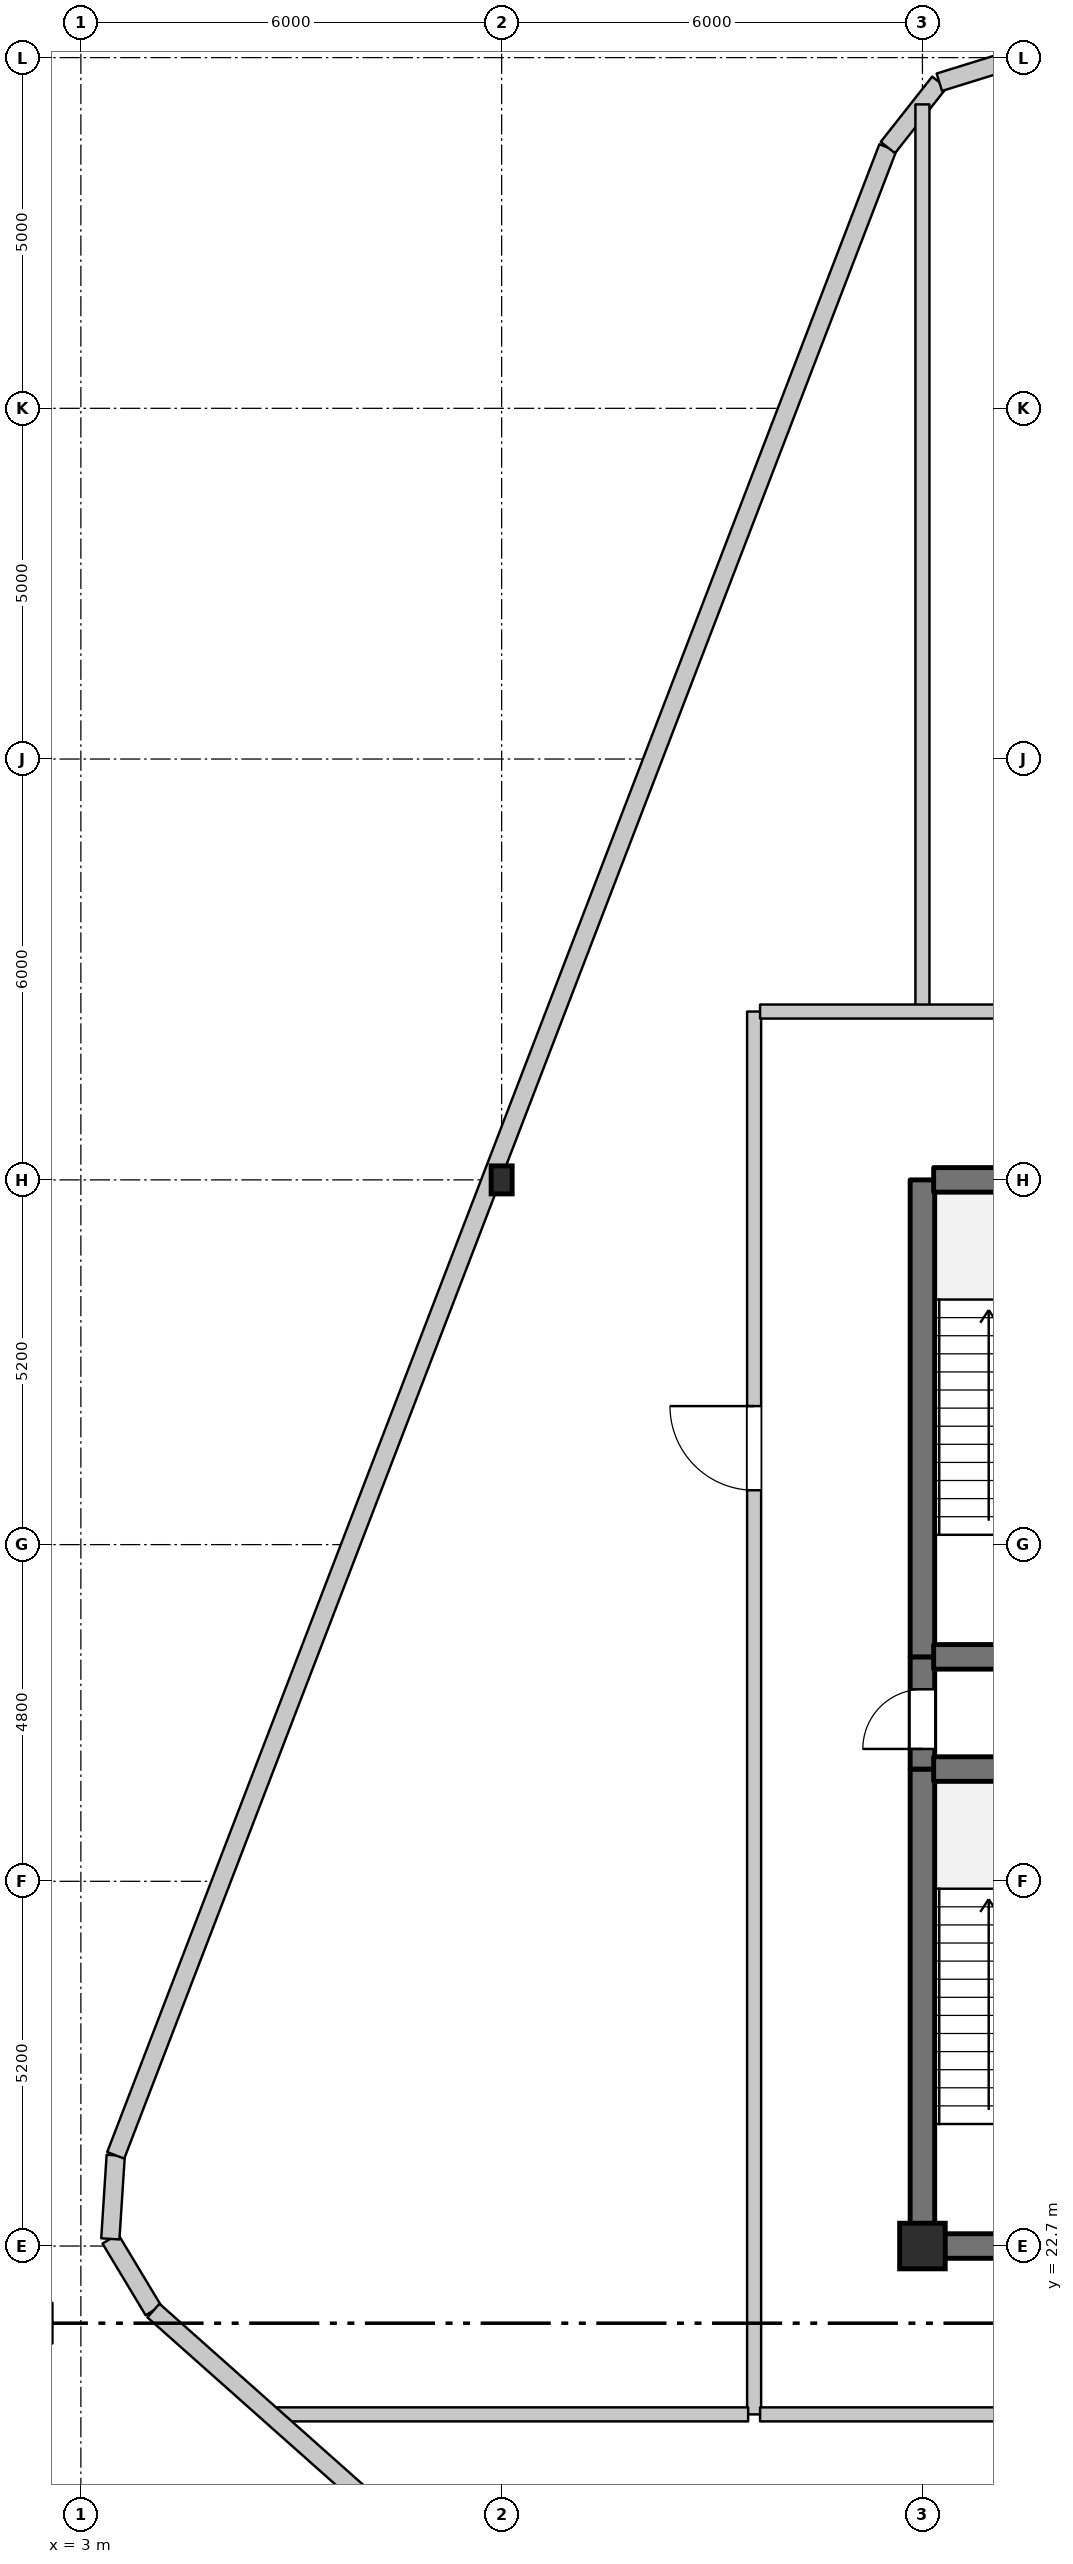
"""IFC4 building model, lengths in metres.
Left out: names, types, materials, properties, quantities, classifications, styles, units other than length and angle.
Written with IfcOpenShell. Run it as: python <this file> out.ifc"""

import sys

from ifc_helpers import new_model, si_unit, direction, frame, frame_2d, origin, origin_2d, place, context, subcontext, project, spatial, rectangle, i_section, extrude, element, fill, save


model = new_model("IFC4")
c1 = context("Model", 3, precision=1e-05, world=origin(), true_north=direction((0.0, 1.0)))
c2 = subcontext(c1, "Body", "Model", "MODEL_VIEW")
j1 = project(units=[si_unit("LENGTHUNIT", "METRE"), si_unit("PLANEANGLEUNIT", "RADIAN")], contexts=[c1])
p1 = place(None, origin())
s1 = spatial("IfcSite", under=j1, at=p1, CompositionType="ELEMENT")
p2 = place(p1, origin())
s2 = spatial("IfcBuilding", under=s1, at=p2, CompositionType="ELEMENT")
p3 = place(p2, frame((0.0, 0.0, 314.7)))
s3 = spatial("IfcBuildingStorey", under=s2, at=p3, CompositionType="ELEMENT", Elevation=314.7)
p4 = place(p3, frame((9.0, 37.9, 0.0), z_axis=(0.0, 0.0, 1.0), x_axis=(1.0, 0.0, 0.0)))
e1 = element("IfcColumn", 1, at=p4, inside=s3, PredefinedType="COLUMN", context=c2, shape_type="SweptSolid", body=[
    extrude(i_section(OverallWidth=0.3, OverallDepth=0.4, WebThickness=0.013, FlangeThickness=0.024, FilletRadius=0.027, at=origin_2d()), origin(), (0.0, 0.0, 1.0), 5.3),
])
p5 = place(p3, frame((15.0, 22.7, 0.0), z_axis=(0.0, 0.0, 1.0), x_axis=(1.0, 0.0, 0.0)))
e2 = element("IfcColumn", 2, at=p5, inside=s3, PredefinedType="COLUMN", context=c2, shape_type="SweptSolid", body=[
    extrude(rectangle(XDim=0.65, YDim=0.65, at=origin_2d()), origin(), (0.0, 0.0, 1.0), 5.3),
])
p6 = place(p3, frame((4.035, 21.78, 0.0), z_axis=(0.0, 0.0, 1.0), x_axis=(-0.51560906497, 0.856823956318, 0.0)))
e3 = element("IfcWall", 3, at=p6, inside=s3, PredefinedType="STANDARD", context=c2, shape_type="SweptSolid", body=[
    extrude(rectangle(XDim=1.193, YDim=0.26, at=frame_2d((0.596, 0.0))), origin(), (0.0, 0.0, 1.0), 4.99),
])
p7 = place(p3, frame((3.42, 22.802, 0.0), z_axis=(0.0, 0.0, 1.0), x_axis=(0.064645147091, 0.997908314906, 0.0)))
e4 = element("IfcWall", 4, at=p7, inside=s3, PredefinedType="STANDARD", context=c2, shape_type="SweptSolid", body=[
    extrude(rectangle(XDim=1.193, YDim=0.26, at=frame_2d((0.597, 0.0))), origin(), (0.0, 0.0, 1.0), 4.99),
])
p8 = place(p3, frame((3.497, 23.993, 0.0), z_axis=(0.0, 0.0, 1.0), x_axis=(0.358990281293, 0.93334129767, 0.0)))
e5 = element("IfcWall", 5, at=p8, inside=s3, PredefinedType="STANDARD", context=c2, shape_type="SweptSolid", body=[
    extrude(rectangle(XDim=30.669, YDim=0.26, at=frame_2d((15.335, 0.0))), origin(), (0.0, 0.0, 1.0), 4.99),
])
p9 = place(p3, frame((14.507, 52.618, 0.0), z_axis=(0.0, 0.0, 1.0), x_axis=(0.619003121736, 0.78538852505, 0.0)))
e6 = element("IfcWall", 6, at=p9, inside=s3, PredefinedType="STANDARD", context=c2, shape_type="SweptSolid", body=[
    extrude(rectangle(XDim=1.186, YDim=0.26, at=frame_2d((0.593, 0.0))), origin(), (0.0, 0.0, 1.0), 4.99),
])
p10 = place(p3, frame((15.241, 53.549, 0.0), z_axis=(0.0, 0.0, 1.0), x_axis=(0.955256816454, 0.295777643879, 0.0)))
e7 = element("IfcWall", 7, at=p10, inside=s3, PredefinedType="STANDARD", context=c2, shape_type="SweptSolid", body=[
    extrude(rectangle(XDim=1.186, YDim=0.26, at=frame_2d((0.593, 0.0))), origin(), (0.0, 0.0, 1.0), 4.99),
])
p11 = place(p3, frame((12.6, 20.3, 0.0), z_axis=(0.0, 0.0, 1.0), x_axis=(0.0, 1.0, 0.0)))
e8 = element("IfcWall", 8, at=p11, inside=s3, PredefinedType="STANDARD", context=c2, shape_type="SweptSolid", body=[
    extrude(rectangle(XDim=20.0, YDim=0.2, at=frame_2d((10.0, 0.0))), origin(), (0.0, 0.0, 1.0), 4.99),
])
p12 = place(p11, frame((13.175, 0.0, 0.0)))
e9 = element("IfcOpeningElement", 9, at=p12, cuts=e8, PredefinedType="OPENING", context=c2, shape_type="SweptSolid", body=[
    extrude(rectangle(XDim=1.2, YDim=2.2, at=frame_2d((0.6, 1.1))), frame((0.0, 0.11, 0.0), z_axis=(0.0, -1.0, 0.0), x_axis=(1.0, 0.0, 0.0)), (0.0, 0.0, 1.0), 0.22),
])
p13 = place(p3, frame((15.0, 22.7, 0.0), z_axis=(0.0, 0.0, 1.0), x_axis=(0.0, 1.0, 0.0)))
e10 = element("IfcWall", 10, at=p13, inside=s3, PredefinedType="SHEAR", context=c2, shape_type="SweptSolid", body=[
    extrude(rectangle(XDim=6.8, YDim=0.35, at=frame_2d((3.4, 0.0))), origin(), (0.0, 0.0, 1.0), 4.99),
])
p14 = place(p3, frame((15.0, 29.5, 0.0), z_axis=(0.0, 0.0, 1.0), x_axis=(0.0, 1.0, 0.0)))
e11 = element("IfcWall", 11, at=p14, inside=s3, PredefinedType="SHEAR", context=c2, shape_type="SweptSolid", body=[
    extrude(rectangle(XDim=1.6, YDim=0.35, at=frame_2d((0.8, 0.0))), origin(), (0.0, 0.0, 1.0), 4.99),
])
p15 = place(p14, frame((0.287, 0.0, 0.0)))
e12 = element("IfcOpeningElement", 12, at=p15, cuts=e11, PredefinedType="OPENING", context=c2, shape_type="SweptSolid", body=[
    extrude(rectangle(XDim=0.85, YDim=2.1, at=frame_2d((0.425, 1.05))), frame((0.0, 0.185, 0.0), z_axis=(0.0, -1.0, 0.0), x_axis=(1.0, 0.0, 0.0)), (0.0, 0.0, 1.0), 0.37),
])
p16 = place(p3, frame((15.0, 31.1, 0.0), z_axis=(0.0, 0.0, 1.0), x_axis=(0.0, 1.0, 0.0)))
e13 = element("IfcWall", 13, at=p16, inside=s3, PredefinedType="SHEAR", context=c2, shape_type="SweptSolid", body=[
    extrude(rectangle(XDim=6.8, YDim=0.35, at=frame_2d((3.4, 0.0))), origin(), (0.0, 0.0, 1.0), 4.99),
])
p17 = place(p3, frame((15.0, 40.3, 0.0), z_axis=(0.0, 0.0, 1.0), x_axis=(0.0, 1.0, 0.0)))
e14 = element("IfcWall", 14, at=p17, inside=s3, PredefinedType="STANDARD", context=c2, shape_type="SweptSolid", body=[
    extrude(rectangle(XDim=12.933, YDim=0.2, at=frame_2d((6.466, 0.0))), origin(), (0.0, 0.0, 1.0), 4.99),
])
p18 = place(p3, frame((5.71, 20.3, 0.0), z_axis=(0.0, 0.0, 1.0), x_axis=(1.0, 0.0, 0.0)))
e15 = element("IfcWall", 15, at=p18, inside=s3, PredefinedType="STANDARD", context=c2, shape_type="SweptSolid", body=[
    extrude(rectangle(XDim=6.805, YDim=0.2, at=frame_2d((3.402, 0.0))), origin(), (0.0, 0.0, 1.0), 4.99),
])
p19 = place(p3, frame((12.685, 20.3, 0.0), z_axis=(0.0, 0.0, 1.0), x_axis=(1.0, 0.0, 0.0)))
e16 = element("IfcWall", 16, at=p19, inside=s3, PredefinedType="STANDARD", context=c2, shape_type="SweptSolid", body=[
    extrude(rectangle(XDim=20.23, YDim=0.2, at=frame_2d((10.115, 0.0))), origin(), (0.0, 0.0, 1.0), 4.99),
])
p20 = place(p19, frame((6.715, 0.0, 0.0)))
e17 = element("IfcOpeningElement", 17, at=p20, cuts=e16, PredefinedType="OPENING", context=c2, shape_type="SweptSolid", body=[
    extrude(rectangle(XDim=1.2, YDim=2.2, at=frame_2d((0.6, 1.1))), frame((0.0, 0.11, 0.0), z_axis=(0.0, -1.0, 0.0), x_axis=(1.0, 0.0, 0.0)), (0.0, 0.0, 1.0), 0.22),
])
p21 = place(p19, frame((16.14, 0.0, 0.0)))
e18 = element("IfcOpeningElement", 18, at=p21, cuts=e16, PredefinedType="OPENING", context=c2, shape_type="SweptSolid", body=[
    extrude(rectangle(XDim=1.2, YDim=2.2, at=frame_2d((0.6, 1.1))), frame((0.0, 0.11, 0.0), z_axis=(0.0, -1.0, 0.0), x_axis=(1.0, 0.0, 0.0)), (0.0, 0.0, 1.0), 0.22),
])
for number, where, z_axis, x_axis in (
    (19, (15.16, 22.7, 0.0), (0.0, 0.0, 1.0), (1.0, 0.0, 0.0)),
    (20, (15.16, 29.5, 0.0), (0.0, 0.0, 1.0), (1.0, 0.0, 0.0)),
    (21, (15.16, 31.1, 0.0), (0.0, 0.0, 1.0), (1.0, 0.0, 0.0)),
    (22, (15.16, 37.9, 0.0), (0.0, 0.0, 1.0), (1.0, 0.0, 0.0)),
):
    element("IfcWall", number, at=place(p3, frame(where, z_axis=z_axis, x_axis=x_axis)), inside=s3, PredefinedType="SHEAR", context=c2, shape_type="SweptSolid", body=[
        extrude(rectangle(XDim=3.68, YDim=0.35, at=frame_2d((1.84, 0.0))), origin(), (0.0, 0.0, 1.0), 4.99),
    ])
p22 = place(p3, frame((12.685, 40.3, 0.0), z_axis=(0.0, 0.0, 1.0), x_axis=(1.0, 0.0, 0.0)))
e23 = element("IfcWall", 23, at=p22, inside=s3, PredefinedType="STANDARD", context=c2, shape_type="SweptSolid", body=[
    extrude(rectangle(XDim=20.23, YDim=0.2, at=frame_2d((10.115, 0.0))), origin(), (0.0, 0.0, 1.0), 4.99),
])
p23 = place(p22, frame((12.14, 0.0, 0.0)))
e24 = element("IfcOpeningElement", 24, at=p23, cuts=e23, PredefinedType="OPENING", context=c2, shape_type="SweptSolid", body=[
    extrude(rectangle(XDim=1.2, YDim=2.2, at=frame_2d((0.6, 1.1))), frame((0.0, 0.11, 0.0), z_axis=(0.0, -1.0, 0.0), x_axis=(1.0, 0.0, 0.0)), (0.0, 0.0, 1.0), 0.22),
])
p24 = place(p3, frame((17.438, 9.866, 0.0), z_axis=(0.0, 0.0, 1.0), x_axis=(-0.747416078768, 0.664356233657, 0.0)))
e25 = element("IfcWall", 25, at=p24, inside=s3, PredefinedType="STANDARD", context=c2, shape_type="SweptSolid", body=[
    extrude(rectangle(XDim=17.933, YDim=0.26, at=frame_2d((8.966, 0.0))), origin(), (0.0, 0.0, 1.0), 4.99),
])
p25 = place(p12, origin())
e26 = element("IfcDoor", 26, at=p25, inside=s3, OperationType="SINGLE_SWING_RIGHT", PredefinedType="DOOR", context=c2, shape_type="SweptSolid", body=[
    extrude(rectangle(XDim=1.2, YDim=2.2, at=frame_2d((0.6, 1.1))), frame((0.0, 0.025, 0.0), z_axis=(0.0, -1.0, 0.0), x_axis=(1.0, 0.0, 0.0)), (0.0, 0.0, 1.0), 0.05),
])
fill(e9, e26)
p26 = place(p15, origin())
e27 = element("IfcDoor", 27, at=p26, inside=s3, OperationType="SINGLE_SWING_LEFT", PredefinedType="DOOR", context=c2, shape_type="SweptSolid", body=[
    extrude(rectangle(XDim=0.85, YDim=2.1, at=frame_2d((0.425, 1.05))), frame((0.0, 0.025, 0.0), z_axis=(0.0, -1.0, 0.0), x_axis=(1.0, 0.0, 0.0)), (0.0, 0.0, 1.0), 0.05),
])
fill(e12, e27)
save(model, sys.argv[1])
